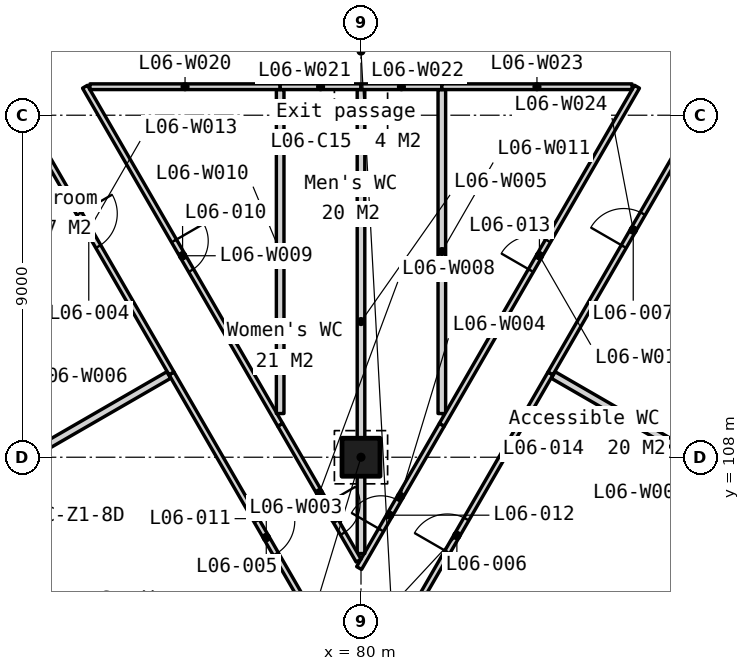
"""IFC4 building model, lengths in metres.
Left out: names, types, materials, properties, quantities, classifications, styles, units other than length and angle.
Written with IfcOpenShell. Run it as: python <this file> out.ifc"""

import sys

from ifc_helpers import new_model, si_unit, direction, frame, frame_2d, origin, origin_2d, place, context, subcontext, project, spatial, polyline, rectangle, outline, extrude, element, fill, save


model = new_model("IFC4")
c1 = context("Model", 3, precision=1e-05, world=origin(), true_north=direction((0.0, 1.0)))
c2 = subcontext(c1, "Body", "Model", "MODEL_VIEW")
j1 = project(units=[si_unit("LENGTHUNIT", "METRE"), si_unit("PLANEANGLEUNIT", "RADIAN")], contexts=[c1])
p1 = place(None, origin())
s1 = spatial("IfcSite", under=j1, at=p1, CompositionType="ELEMENT")
p2 = place(p1, origin())
s2 = spatial("IfcBuilding", under=s1, at=p2, CompositionType="ELEMENT")
p3 = place(p2, frame((0.0, 0.0, 35.0)))
s3 = spatial("IfcBuildingStorey", under=s2, at=p3, CompositionType="ELEMENT", Elevation=35.0)
p4 = place(p3, frame((80.0, 108.0, 0.0), z_axis=(0.0, 0.0, 1.0), x_axis=(1.0, 0.0, 0.0)))
e1 = element("IfcColumn", 1, at=p4, inside=s3, PredefinedType="COLUMN", context=c2, shape_type="SweptSolid", body=[
    extrude(rectangle(XDim=1.0, YDim=1.0, at=origin_2d()), origin(), (0.0, 0.0, 1.0), 3.5),
])
p5 = place(p3, frame((54.495, 129.397, -0.2), z_axis=(0.0, 0.0, 1.0), x_axis=(0.499999201451, -0.866025864826, 0.0)))
e2 = element("IfcWall", 2, at=p5, inside=s3, PredefinedType="SOLIDWALL", context=c2, shape_type="SweptSolid", body=[
    extrude(outline(polyline([(44.8, 0.0), (44.8, 3.55), (0.0, 3.55), (0.0, 0.0), (44.8, 0.0)])), frame((0.0, 0.225, 0.0), z_axis=(0.0, -1.0, 0.0), x_axis=(1.0, 0.0, 0.0)), (0.0, 0.0, 1.0), 0.45),
])
p6 = place(p5, frame((2.43, 0.0, 1.1)))
e3 = element("IfcOpeningElement", 3, at=p6, cuts=e2, PredefinedType="OPENING", context=c2, shape_type="SweptSolid", body=[
    extrude(rectangle(XDim=1.8, YDim=1.5, at=frame_2d((0.9, 0.75))), frame((0.0, 0.235, 0.0), z_axis=(0.0, -1.0, 0.0), x_axis=(1.0, 0.0, 0.0)), (0.0, 0.0, 1.0), 0.47),
])
p7 = place(p5, frame((4.73, 0.0, 0.2)))
e4 = element("IfcOpeningElement", 4, at=p7, cuts=e2, PredefinedType="OPENING", context=c2, shape_type="SweptSolid", body=[
    extrude(rectangle(XDim=1.8, YDim=2.4, at=frame_2d((0.9, 1.2))), frame((0.0, 0.235, 0.0), z_axis=(0.0, -1.0, 0.0), x_axis=(1.0, 0.0, 0.0)), (0.0, 0.0, 1.0), 0.47),
])
p8 = place(p5, frame((11.39, 0.0, 1.1)))
e5 = element("IfcOpeningElement", 5, at=p8, cuts=e2, PredefinedType="OPENING", context=c2, shape_type="SweptSolid", body=[
    extrude(rectangle(XDim=1.8, YDim=1.5, at=frame_2d((0.9, 0.75))), frame((0.0, 0.235, 0.0), z_axis=(0.0, -1.0, 0.0), x_axis=(1.0, 0.0, 0.0)), (0.0, 0.0, 1.0), 0.47),
])
p9 = place(p5, frame((13.69, 0.0, 1.1)))
e6 = element("IfcOpeningElement", 6, at=p9, cuts=e2, PredefinedType="OPENING", context=c2, shape_type="SweptSolid", body=[
    extrude(rectangle(XDim=1.8, YDim=1.5, at=frame_2d((0.9, 0.75))), frame((0.0, 0.235, 0.0), z_axis=(0.0, -1.0, 0.0), x_axis=(1.0, 0.0, 0.0)), (0.0, 0.0, 1.0), 0.47),
])
p10 = place(p5, frame((20.35, 0.0, 0.2)))
e7 = element("IfcOpeningElement", 7, at=p10, cuts=e2, PredefinedType="OPENING", context=c2, shape_type="SweptSolid", body=[
    extrude(rectangle(XDim=1.8, YDim=2.4, at=frame_2d((0.9, 1.2))), frame((0.0, 0.235, 0.0), z_axis=(0.0, -1.0, 0.0), x_axis=(1.0, 0.0, 0.0)), (0.0, 0.0, 1.0), 0.47),
])
p11 = place(p5, frame((22.65, 0.0, 1.1)))
e8 = element("IfcOpeningElement", 8, at=p11, cuts=e2, PredefinedType="OPENING", context=c2, shape_type="SweptSolid", body=[
    extrude(rectangle(XDim=1.8, YDim=1.5, at=frame_2d((0.9, 0.75))), frame((0.0, 0.235, 0.0), z_axis=(0.0, -1.0, 0.0), x_axis=(1.0, 0.0, 0.0)), (0.0, 0.0, 1.0), 0.47),
])
p12 = place(p5, frame((29.31, 0.0, 1.1)))
e9 = element("IfcOpeningElement", 9, at=p12, cuts=e2, PredefinedType="OPENING", context=c2, shape_type="SweptSolid", body=[
    extrude(rectangle(XDim=1.8, YDim=1.5, at=frame_2d((0.9, 0.75))), frame((0.0, 0.235, 0.0), z_axis=(0.0, -1.0, 0.0), x_axis=(1.0, 0.0, 0.0)), (0.0, 0.0, 1.0), 0.47),
])
p13 = place(p5, frame((31.61, 0.0, 0.2)))
e10 = element("IfcOpeningElement", 10, at=p13, cuts=e2, PredefinedType="OPENING", context=c2, shape_type="SweptSolid", body=[
    extrude(rectangle(XDim=1.8, YDim=2.4, at=frame_2d((0.9, 1.2))), frame((0.0, 0.235, 0.0), z_axis=(0.0, -1.0, 0.0), x_axis=(1.0, 0.0, 0.0)), (0.0, 0.0, 1.0), 0.47),
])
p14 = place(p5, frame((38.27, 0.0, 1.1)))
e11 = element("IfcOpeningElement", 11, at=p14, cuts=e2, PredefinedType="OPENING", context=c2, shape_type="SweptSolid", body=[
    extrude(rectangle(XDim=1.8, YDim=1.5, at=frame_2d((0.9, 0.75))), frame((0.0, 0.235, 0.0), z_axis=(0.0, -1.0, 0.0), x_axis=(1.0, 0.0, 0.0)), (0.0, 0.0, 1.0), 0.47),
])
p15 = place(p5, frame((40.57, 0.0, 1.1)))
e12 = element("IfcOpeningElement", 12, at=p15, cuts=e2, PredefinedType="OPENING", context=c2, shape_type="SweptSolid", body=[
    extrude(rectangle(XDim=1.8, YDim=1.5, at=frame_2d((0.9, 0.75))), frame((0.0, 0.235, 0.0), z_axis=(0.0, -1.0, 0.0), x_axis=(1.0, 0.0, 0.0)), (0.0, 0.0, 1.0), 0.47),
])
p16 = place(p3, frame((83.105, 90.599, -0.2), z_axis=(0.0, 0.0, 1.0), x_axis=(0.499999201451, 0.866025864826, 0.0)))
e13 = element("IfcWall", 13, at=p16, inside=s3, PredefinedType="SOLIDWALL", context=c2, shape_type="SweptSolid", body=[
    extrude(outline(polyline([(44.8, 0.0), (44.8, 3.55), (0.0, 3.55), (0.0, 0.0), (44.8, 0.0)])), frame((0.0, 0.225, 0.0), z_axis=(0.0, -1.0, 0.0), x_axis=(1.0, 0.0, 0.0)), (0.0, 0.0, 1.0), 0.45),
])
p17 = place(p16, frame((2.43, 0.0, 1.1)))
e14 = element("IfcOpeningElement", 14, at=p17, cuts=e13, PredefinedType="OPENING", context=c2, shape_type="SweptSolid", body=[
    extrude(rectangle(XDim=1.8, YDim=1.5, at=frame_2d((0.9, 0.75))), frame((0.0, 0.235, 0.0), z_axis=(0.0, -1.0, 0.0), x_axis=(1.0, 0.0, 0.0)), (0.0, 0.0, 1.0), 0.47),
])
p18 = place(p16, frame((4.73, 0.0, 0.2)))
e15 = element("IfcOpeningElement", 15, at=p18, cuts=e13, PredefinedType="OPENING", context=c2, shape_type="SweptSolid", body=[
    extrude(rectangle(XDim=1.8, YDim=2.4, at=frame_2d((0.9, 1.2))), frame((0.0, 0.235, 0.0), z_axis=(0.0, -1.0, 0.0), x_axis=(1.0, 0.0, 0.0)), (0.0, 0.0, 1.0), 0.47),
])
p19 = place(p16, frame((11.39, 0.0, 1.1)))
e16 = element("IfcOpeningElement", 16, at=p19, cuts=e13, PredefinedType="OPENING", context=c2, shape_type="SweptSolid", body=[
    extrude(rectangle(XDim=1.8, YDim=1.5, at=frame_2d((0.9, 0.75))), frame((0.0, 0.235, 0.0), z_axis=(0.0, -1.0, 0.0), x_axis=(1.0, 0.0, 0.0)), (0.0, 0.0, 1.0), 0.47),
])
p20 = place(p16, frame((13.69, 0.0, 1.1)))
e17 = element("IfcOpeningElement", 17, at=p20, cuts=e13, PredefinedType="OPENING", context=c2, shape_type="SweptSolid", body=[
    extrude(rectangle(XDim=1.8, YDim=1.5, at=frame_2d((0.9, 0.75))), frame((0.0, 0.235, 0.0), z_axis=(0.0, -1.0, 0.0), x_axis=(1.0, 0.0, 0.0)), (0.0, 0.0, 1.0), 0.47),
])
p21 = place(p16, frame((20.35, 0.0, 0.2)))
e18 = element("IfcOpeningElement", 18, at=p21, cuts=e13, PredefinedType="OPENING", context=c2, shape_type="SweptSolid", body=[
    extrude(rectangle(XDim=1.8, YDim=2.4, at=frame_2d((0.9, 1.2))), frame((0.0, 0.235, 0.0), z_axis=(0.0, -1.0, 0.0), x_axis=(1.0, 0.0, 0.0)), (0.0, 0.0, 1.0), 0.47),
])
p22 = place(p16, frame((22.65, 0.0, 1.1)))
e19 = element("IfcOpeningElement", 19, at=p22, cuts=e13, PredefinedType="OPENING", context=c2, shape_type="SweptSolid", body=[
    extrude(rectangle(XDim=1.8, YDim=1.5, at=frame_2d((0.9, 0.75))), frame((0.0, 0.235, 0.0), z_axis=(0.0, -1.0, 0.0), x_axis=(1.0, 0.0, 0.0)), (0.0, 0.0, 1.0), 0.47),
])
p23 = place(p16, frame((29.31, 0.0, 1.1)))
e20 = element("IfcOpeningElement", 20, at=p23, cuts=e13, PredefinedType="OPENING", context=c2, shape_type="SweptSolid", body=[
    extrude(rectangle(XDim=1.8, YDim=1.5, at=frame_2d((0.9, 0.75))), frame((0.0, 0.235, 0.0), z_axis=(0.0, -1.0, 0.0), x_axis=(1.0, 0.0, 0.0)), (0.0, 0.0, 1.0), 0.47),
])
p24 = place(p16, frame((31.61, 0.0, 0.2)))
e21 = element("IfcOpeningElement", 21, at=p24, cuts=e13, PredefinedType="OPENING", context=c2, shape_type="SweptSolid", body=[
    extrude(rectangle(XDim=1.8, YDim=2.4, at=frame_2d((0.9, 1.2))), frame((0.0, 0.235, 0.0), z_axis=(0.0, -1.0, 0.0), x_axis=(1.0, 0.0, 0.0)), (0.0, 0.0, 1.0), 0.47),
])
p25 = place(p16, frame((38.27, 0.0, 1.1)))
e22 = element("IfcOpeningElement", 22, at=p25, cuts=e13, PredefinedType="OPENING", context=c2, shape_type="SweptSolid", body=[
    extrude(rectangle(XDim=1.8, YDim=1.5, at=frame_2d((0.9, 0.75))), frame((0.0, 0.235, 0.0), z_axis=(0.0, -1.0, 0.0), x_axis=(1.0, 0.0, 0.0)), (0.0, 0.0, 1.0), 0.47),
])
p26 = place(p16, frame((40.57, 0.0, 1.1)))
e23 = element("IfcOpeningElement", 23, at=p26, cuts=e13, PredefinedType="OPENING", context=c2, shape_type="SweptSolid", body=[
    extrude(rectangle(XDim=1.8, YDim=1.5, at=frame_2d((0.9, 0.75))), frame((0.0, 0.235, 0.0), z_axis=(0.0, -1.0, 0.0), x_axis=(1.0, 0.0, 0.0)), (0.0, 0.0, 1.0), 0.47),
])
for number, where, z_axis, x_axis in (
    (24, (110.208, 129.091, 0.0), (0.0, 0.0, 1.0), (-0.5, -0.866, 0.0)),
    (25, (77.166, 81.679, 0.0), (0.0, 0.0, 1.0), (-0.5, 0.866, 0.0)),
):
    element("IfcWall", number, at=place(p3, frame(where, z_axis=z_axis, x_axis=x_axis)), inside=s3, PredefinedType="STANDARD", context=c2, shape_type="SweptSolid", body=[
        extrude(rectangle(XDim=54.747, YDim=1.0, at=frame_2d((27.374, 0.0))), origin(), (0.0, 0.0, 1.0), 0.6),
    ])
p27 = place(p3, frame((75.015, 110.206, 0.0), z_axis=(0.0, 0.0, 1.0), x_axis=(0.49999446006, -0.866028602246, 0.0)))
e26 = element("IfcWall", 26, at=p27, inside=s3, PredefinedType="PARTITIONING", context=c2, shape_type="SweptSolid", body=[
    extrude(rectangle(XDim=9.971, YDim=0.15, at=frame_2d((4.985, 0.0))), origin(), (0.0, 0.0, 1.0), 3.35),
])
p28 = place(p27, frame((4.485, 0.0, 0.0)))
e27 = element("IfcOpeningElement", 27, at=p28, cuts=e26, PredefinedType="OPENING", context=c2, shape_type="SweptSolid", body=[
    extrude(rectangle(XDim=1.0, YDim=2.1, at=frame_2d((0.5, 1.05))), frame((0.0, 0.085, 0.0), z_axis=(0.0, -1.0, 0.0), x_axis=(1.0, 0.0, 0.0)), (0.0, 0.0, 1.0), 0.17),
])
p29 = place(p3, frame((79.95, 105.084, 0.0), z_axis=(0.0, 0.0, 1.0), x_axis=(0.500016925002, 0.866015631909, 0.0)))
e28 = element("IfcWall", 28, at=p29, inside=s3, PredefinedType="PARTITIONING", context=c2, shape_type="SweptSolid", body=[
    extrude(rectangle(XDim=4.354, YDim=0.15, at=frame_2d((2.177, 0.0))), origin(), (0.0, 0.0, 1.0), 3.35),
])
p30 = place(p29, frame((1.156, 0.0, 0.0)))
e29 = element("IfcOpeningElement", 29, at=p30, cuts=e28, PredefinedType="OPENING", context=c2, shape_type="SweptSolid", body=[
    extrude(rectangle(XDim=0.9, YDim=2.1, at=frame_2d((0.45, 1.05))), frame((0.0, 0.085, 0.0), z_axis=(0.0, -1.0, 0.0), x_axis=(1.0, 0.0, 0.0)), (0.0, 0.0, 1.0), 0.17),
])
p31 = place(p3, frame((80.0, 105.466, 0.0), z_axis=(0.0, 0.0, 1.0), x_axis=(0.0, 1.0, 0.0)))
e30 = element("IfcWall", 30, at=p31, inside=s3, PredefinedType="PARTITIONING", context=c2, shape_type="SweptSolid", body=[
    extrude(rectangle(XDim=12.209, YDim=0.2, at=frame_2d((6.105, 0.0))), origin(), (0.0, 0.0, 1.0), 2.801),
])
for number, where, z_axis, x_axis in (
    (31, (68.13, 106.23, 0.0), (0.0, 0.0, 1.0), (0.866, 0.5, 0.0)),
    (32, (85.059, 110.163, 0.0), (0.0, 0.0, 1.0), (0.866, -0.5, 0.0)),
):
    element("IfcWall", number, at=place(p3, frame(where, z_axis=z_axis, x_axis=x_axis)), inside=s3, PredefinedType="PARTITIONING", context=c2, shape_type="SweptSolid", body=[
        extrude(rectangle(XDim=7.865, YDim=0.2, at=frame_2d((3.933, 0.0))), origin(), (0.0, 0.0, 1.0), 3.35),
    ])
p32 = place(p3, frame((77.873, 108.854, 0.0), z_axis=(0.0, 0.0, 1.0), x_axis=(0.500005674609, -0.866022127522, 0.0)))
e33 = element("IfcWall", 33, at=p32, inside=s3, PredefinedType="PARTITIONING", context=c2, shape_type="SweptSolid", body=[
    extrude(rectangle(XDim=4.129, YDim=0.15, at=frame_2d((2.064, 0.0))), origin(), (0.0, 0.0, 1.0), 3.35),
])
p33 = place(p32, frame((2.403, 0.0, 0.0)))
e34 = element("IfcOpeningElement", 34, at=p33, cuts=e33, PredefinedType="OPENING", context=c2, shape_type="SweptSolid", body=[
    extrude(rectangle(XDim=0.9, YDim=2.1, at=frame_2d((0.45, 1.05))), frame((0.0, 0.085, 0.0), z_axis=(0.0, -1.0, 0.0), x_axis=(1.0, 0.0, 0.0)), (0.0, 0.0, 1.0), 0.17),
])
p34 = place(p3, frame((72.737, 117.75, 0.0), z_axis=(0.0, 0.0, 1.0), x_axis=(0.499994038704, -0.866028845513, 0.0)))
e35 = element("IfcWall", 35, at=p34, inside=s3, PredefinedType="PARTITIONING", context=c2, shape_type="SweptSolid", body=[
    extrude(rectangle(XDim=10.272, YDim=0.15, at=frame_2d((5.136, 0.0))), origin(), (0.0, 0.0, 1.0), 3.35),
])
p35 = place(p34, frame((4.686, 0.0, 0.0)))
e36 = element("IfcOpeningElement", 36, at=p35, cuts=e35, PredefinedType="OPENING", context=c2, shape_type="SweptSolid", body=[
    extrude(rectangle(XDim=0.9, YDim=2.1, at=frame_2d((0.45, 1.05))), frame((0.0, 0.085, 0.0), z_axis=(0.0, -1.0, 0.0), x_axis=(1.0, 0.0, 0.0)), (0.0, 0.0, 1.0), 0.17),
])
for number, where, z_axis, x_axis in (
    (37, (77.873, 109.15, 0.0), (0.0, 0.0, 1.0), (0.0, 1.0, 0.0)),
    (38, (82.127, 109.15, 0.0), (0.0, 0.0, 1.0), (0.0, 1.0, 0.0)),
):
    element("IfcWall", number, at=place(p3, frame(where, z_axis=z_axis, x_axis=x_axis)), inside=s3, PredefinedType="PARTITIONING", context=c2, shape_type="SweptSolid", body=[
        extrude(rectangle(XDim=8.525, YDim=0.2, at=frame_2d((4.263, 0.0))), origin(), (0.0, 0.0, 1.0), 3.35),
    ])
p36 = place(p3, frame((82.127, 108.854, 0.0), z_axis=(0.0, 0.0, 1.0), x_axis=(0.499994038704, 0.866028845513, 0.0)))
e39 = element("IfcWall", 39, at=p36, inside=s3, PredefinedType="PARTITIONING", context=c2, shape_type="SweptSolid", body=[
    extrude(rectangle(XDim=10.272, YDim=0.15, at=frame_2d((5.136, 0.0))), origin(), (0.0, 0.0, 1.0), 3.35),
])
p37 = place(p36, frame((4.686, 0.0, 0.0)))
e40 = element("IfcOpeningElement", 40, at=p37, cuts=e39, PredefinedType="OPENING", context=c2, shape_type="SweptSolid", body=[
    extrude(rectangle(XDim=0.9, YDim=2.1, at=frame_2d((0.45, 1.05))), frame((0.0, 0.085, 0.0), z_axis=(0.0, -1.0, 0.0), x_axis=(1.0, 0.0, 0.0)), (0.0, 0.0, 1.0), 0.17),
])
p38 = place(p3, frame((70.659, 117.75, 0.0), z_axis=(0.0, 0.0, 1.0), x_axis=(0.500015174863, -0.866016642396, 0.0)))
e41 = element("IfcWall", 41, at=p38, inside=s3, PredefinedType="PARTITIONING", context=c2, shape_type="SweptSolid", body=[
    extrude(rectangle(XDim=8.712, YDim=0.15, at=frame_2d((4.356, 0.0))), origin(), (0.0, 0.0, 1.0), 3.35),
])
p39 = place(p38, frame((3.856, 0.0, 0.0)))
e42 = element("IfcOpeningElement", 42, at=p39, cuts=e41, PredefinedType="OPENING", context=c2, shape_type="SweptSolid", body=[
    extrude(rectangle(XDim=1.0, YDim=2.1, at=frame_2d((0.5, 1.05))), frame((0.0, 0.085, 0.0), z_axis=(0.0, -1.0, 0.0), x_axis=(1.0, 0.0, 0.0)), (0.0, 0.0, 1.0), 0.17),
])
p40 = place(p3, frame((80.06, 101.675, 0.0), z_axis=(0.0, 0.0, 1.0), x_axis=(0.49999348569, 0.86602916479, 0.0)))
e43 = element("IfcWall", 43, at=p40, inside=s3, PredefinedType="PARTITIONING", context=c2, shape_type="SweptSolid", body=[
    extrude(rectangle(XDim=9.851, YDim=0.15, at=frame_2d((4.925, 0.0))), origin(), (0.0, 0.0, 1.0), 3.35),
])
p41 = place(p40, frame((4.425, 0.0, 0.0)))
e44 = element("IfcOpeningElement", 44, at=p41, cuts=e43, PredefinedType="OPENING", context=c2, shape_type="SweptSolid", body=[
    extrude(rectangle(XDim=1.0, YDim=2.1, at=frame_2d((0.5, 1.05))), frame((0.0, 0.085, 0.0), z_axis=(0.0, -1.0, 0.0), x_axis=(1.0, 0.0, 0.0)), (0.0, 0.0, 1.0), 0.17),
])
p42 = place(p3, frame((72.867, 117.75, 0.0), z_axis=(0.0, 0.0, 1.0), x_axis=(1.0, 0.0, 0.0)))
e45 = element("IfcWall", 45, at=p42, inside=s3, PredefinedType="PARTITIONING", context=c2, shape_type="SweptSolid", body=[
    extrude(rectangle(XDim=5.006, YDim=0.15, at=frame_2d((2.503, 0.0))), origin(), (0.0, 0.0, 1.0), 3.35),
])
for number, where, z_axis, x_axis in (
    (46, (77.873, 117.75, 0.0), (0.0, 0.0, 1.0), (1.0, 0.0, 0.0)),
    (47, (80.0, 117.75, 0.0), (0.0, 0.0, 1.0), (1.0, 0.0, 0.0)),
):
    element("IfcWall", number, at=place(p3, frame(where, z_axis=z_axis, x_axis=x_axis)), inside=s3, PredefinedType="PARTITIONING", context=c2, shape_type="SweptSolid", body=[
        extrude(rectangle(XDim=2.127, YDim=0.15, at=frame_2d((1.063, 0.0))), origin(), (0.0, 0.0, 1.0), 3.35),
    ])
p43 = place(p3, frame((82.127, 117.75, 0.0), z_axis=(0.0, 0.0, 1.0), x_axis=(1.0, 0.0, 0.0)))
e48 = element("IfcWall", 48, at=p43, inside=s3, PredefinedType="PARTITIONING", context=c2, shape_type="SweptSolid", body=[
    extrude(rectangle(XDim=5.006, YDim=0.15, at=frame_2d((2.503, 0.0))), origin(), (0.0, 0.0, 1.0), 3.35),
])
p44 = place(p3, frame((84.985, 110.206, 0.0), z_axis=(0.0, 0.0, 1.0), x_axis=(0.500015174863, 0.866016642396, 0.0)))
e49 = element("IfcWall", 49, at=p44, inside=s3, PredefinedType="PARTITIONING", context=c2, shape_type="SweptSolid", body=[
    extrude(rectangle(XDim=8.712, YDim=0.15, at=frame_2d((4.356, 0.0))), origin(), (0.0, 0.0, 1.0), 3.35),
])
p45 = place(p44, frame((3.856, 0.0, 0.0)))
e50 = element("IfcOpeningElement", 50, at=p45, cuts=e49, PredefinedType="OPENING", context=c2, shape_type="SweptSolid", body=[
    extrude(rectangle(XDim=1.0, YDim=2.1, at=frame_2d((0.5, 1.05))), frame((0.0, 0.085, 0.0), z_axis=(0.0, -1.0, 0.0), x_axis=(1.0, 0.0, 0.0)), (0.0, 0.0, 1.0), 0.17),
])
p46 = place(p39, origin())
e51 = element("IfcDoor", 51, at=p46, inside=s3, OperationType="SINGLE_SWING_LEFT", PredefinedType="DOOR", context=c2, shape_type="SweptSolid", body=[
    extrude(rectangle(XDim=1.0, YDim=2.1, at=frame_2d((0.5, 1.05))), frame((0.0, 0.025, 0.0), z_axis=(0.0, -1.0, 0.0), x_axis=(1.0, 0.0, 0.0)), (0.0, 0.0, 1.0), 0.05),
])
fill(e42, e51)
p47 = place(p28, origin())
e52 = element("IfcDoor", 52, at=p47, inside=s3, OperationType="SINGLE_SWING_LEFT", PredefinedType="DOOR", context=c2, shape_type="SweptSolid", body=[
    extrude(rectangle(XDim=1.0, YDim=2.1, at=frame_2d((0.5, 1.05))), frame((0.0, 0.025, 0.0), z_axis=(0.0, -1.0, 0.0), x_axis=(1.0, 0.0, 0.0)), (0.0, 0.0, 1.0), 0.05),
])
fill(e27, e52)
p48 = place(p41, origin())
e53 = element("IfcDoor", 53, at=p48, inside=s3, OperationType="SINGLE_SWING_LEFT", PredefinedType="DOOR", context=c2, shape_type="SweptSolid", body=[
    extrude(rectangle(XDim=1.0, YDim=2.1, at=frame_2d((0.5, 1.05))), frame((0.0, 0.025, 0.0), z_axis=(0.0, -1.0, 0.0), x_axis=(1.0, 0.0, 0.0)), (0.0, 0.0, 1.0), 0.05),
])
fill(e44, e53)
p49 = place(p45, origin())
e54 = element("IfcDoor", 54, at=p49, inside=s3, OperationType="SINGLE_SWING_LEFT", PredefinedType="DOOR", context=c2, shape_type="SweptSolid", body=[
    extrude(rectangle(XDim=1.0, YDim=2.1, at=frame_2d((0.5, 1.05))), frame((0.0, 0.025, 0.0), z_axis=(0.0, -1.0, 0.0), x_axis=(1.0, 0.0, 0.0)), (0.0, 0.0, 1.0), 0.05),
])
fill(e50, e54)
p50 = place(p35, origin())
e55 = element("IfcDoor", 55, at=p50, inside=s3, OperationType="SINGLE_SWING_LEFT", PredefinedType="DOOR", context=c2, shape_type="SweptSolid", body=[
    extrude(rectangle(XDim=0.9, YDim=2.1, at=frame_2d((0.45, 1.05))), frame((0.0, 0.025, 0.0), z_axis=(0.0, -1.0, 0.0), x_axis=(1.0, 0.0, 0.0)), (0.0, 0.0, 1.0), 0.05),
])
fill(e36, e55)
p51 = place(p33, origin())
e56 = element("IfcDoor", 56, at=p51, inside=s3, OperationType="SINGLE_SWING_LEFT", PredefinedType="DOOR", context=c2, shape_type="SweptSolid", body=[
    extrude(rectangle(XDim=0.9, YDim=2.1, at=frame_2d((0.45, 1.05))), frame((0.0, 0.025, 0.0), z_axis=(0.0, -1.0, 0.0), x_axis=(1.0, 0.0, 0.0)), (0.0, 0.0, 1.0), 0.05),
])
fill(e34, e56)
p52 = place(p30, origin())
e57 = element("IfcDoor", 57, at=p52, inside=s3, OperationType="SINGLE_SWING_LEFT", PredefinedType="DOOR", context=c2, shape_type="SweptSolid", body=[
    extrude(rectangle(XDim=0.9, YDim=2.1, at=frame_2d((0.45, 1.05))), frame((0.0, 0.025, 0.0), z_axis=(0.0, -1.0, 0.0), x_axis=(1.0, 0.0, 0.0)), (0.0, 0.0, 1.0), 0.05),
])
fill(e29, e57)
p53 = place(p37, origin())
e58 = element("IfcDoor", 58, at=p53, inside=s3, OperationType="SINGLE_SWING_LEFT", PredefinedType="DOOR", context=c2, shape_type="SweptSolid", body=[
    extrude(rectangle(XDim=0.9, YDim=2.1, at=frame_2d((0.45, 1.05))), frame((0.0, 0.025, 0.0), z_axis=(0.0, -1.0, 0.0), x_axis=(1.0, 0.0, 0.0)), (0.0, 0.0, 1.0), 0.05),
])
fill(e40, e58)
save(model, sys.argv[1])
